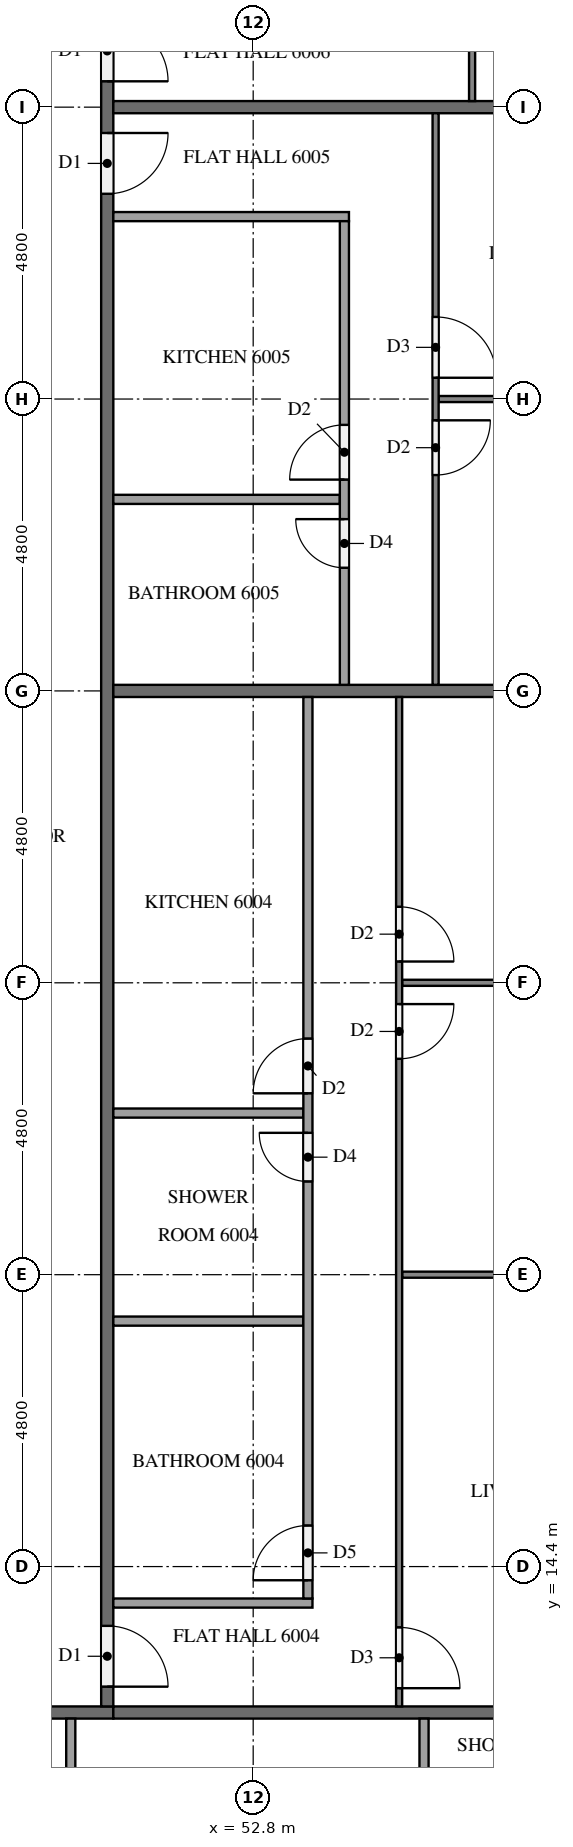
"""IFC4 building model, lengths in metres.
Left out: names, types, materials, properties, quantities, classifications, styles, units other than length and angle.
Written with IfcOpenShell. Run it as: python <this file> out.ifc"""

import sys

from ifc_helpers import new_model, si_unit, direction, frame, frame_2d, origin, place, context, subcontext, project, spatial, rectangle, extrude, element, fill, save


model = new_model("IFC4")
c1 = context("Model", 3, precision=1e-05, world=origin(), true_north=direction((0.0, 1.0)))
c2 = subcontext(c1, "Body", "Model", "MODEL_VIEW")
j1 = project(units=[si_unit("LENGTHUNIT", "METRE"), si_unit("PLANEANGLEUNIT", "RADIAN")], contexts=[c1])
p1 = place(None, origin())
s1 = spatial("IfcSite", under=j1, at=p1, CompositionType="ELEMENT")
p2 = place(p1, origin())
s2 = spatial("IfcBuilding", under=s1, at=p2, CompositionType="ELEMENT")
p3 = place(p2, frame((0.0, 0.0, 229.8)))
s3 = spatial("IfcBuildingStorey", under=s2, at=p3, CompositionType="ELEMENT", Elevation=229.8)
p4 = place(p3, frame((50.5, 12.0, 0.0), z_axis=(0.0, 0.0, 1.0), x_axis=(-1.0, 0.0, 0.0)))
e1 = element("IfcWall", 1, at=p4, inside=s3, PredefinedType="PARTITIONING", context=c2, shape_type="SweptSolid", body=[
    extrude(rectangle(XDim=38.6, YDim=0.2, at=frame_2d((19.3, 0.0))), origin(), (0.0, 0.0, 1.0), 3.1),
])
p5 = place(p4, frame((19.675, 0.0, 0.0)))
e2 = element("IfcOpeningElement", 2, at=p5, cuts=e1, PredefinedType="OPENING", context=c2, shape_type="SweptSolid", body=[
    extrude(rectangle(XDim=1.1, YDim=2.1, at=frame_2d((0.55, 1.05))), frame((0.0, 0.11, 0.0), z_axis=(0.0, -1.0, 0.0), x_axis=(1.0, 0.0, 0.0)), (0.0, 0.0, 1.0), 0.22),
])
p6 = place(p4, frame((2.925, 0.0, 0.0)))
e3 = element("IfcOpeningElement", 3, at=p6, cuts=e1, PredefinedType="OPENING", context=c2, shape_type="SweptSolid", body=[
    extrude(rectangle(XDim=1.0, YDim=2.1, at=frame_2d((0.5, 1.05))), frame((0.0, 0.11, 0.0), z_axis=(0.0, -1.0, 0.0), x_axis=(1.0, 0.0, 0.0)), (0.0, 0.0, 1.0), 0.22),
])
p7 = place(p4, frame((1.075, 0.0, 0.0)))
e4 = element("IfcOpeningElement", 4, at=p7, cuts=e1, PredefinedType="OPENING", context=c2, shape_type="SweptSolid", body=[
    extrude(rectangle(XDim=1.0, YDim=2.1, at=frame_2d((0.5, 1.05))), frame((0.0, 0.11, 0.0), z_axis=(0.0, -1.0, 0.0), x_axis=(1.0, 0.0, 0.0)), (0.0, 0.0, 1.0), 0.22),
])
p8 = place(p3, frame((50.4, 40.7, 0.0), z_axis=(0.0, 0.0, 1.0), x_axis=(0.0, -1.0, 0.0)))
e5 = element("IfcWall", 5, at=p8, inside=s3, PredefinedType="PARTITIONING", context=c2, shape_type="SweptSolid", body=[
    extrude(rectangle(XDim=28.6, YDim=0.2, at=frame_2d((14.3, 0.0))), origin(), (0.0, 0.0, 1.0), 3.1),
])
p9 = place(p8, frame((27.275, 0.0, 0.0)))
e6 = element("IfcOpeningElement", 6, at=p9, cuts=e5, PredefinedType="OPENING", context=c2, shape_type="SweptSolid", body=[
    extrude(rectangle(XDim=1.0, YDim=2.1, at=frame_2d((0.5, 1.05))), frame((0.0, 0.11, 0.0), z_axis=(0.0, -1.0, 0.0), x_axis=(1.0, 0.0, 0.0)), (0.0, 0.0, 1.0), 0.22),
])
p10 = place(p8, frame((2.725, 0.0, 0.0)))
e7 = element("IfcOpeningElement", 7, at=p10, cuts=e5, PredefinedType="OPENING", context=c2, shape_type="SweptSolid", body=[
    extrude(rectangle(XDim=1.0, YDim=2.1, at=frame_2d((0.5, 1.05))), frame((0.0, 0.11, 0.0), z_axis=(0.0, -1.0, 0.0), x_axis=(1.0, 0.0, 0.0)), (0.0, 0.0, 1.0), 0.22),
])
p11 = place(p8, frame((0.875, 0.0, 0.0)))
e8 = element("IfcOpeningElement", 8, at=p11, cuts=e5, PredefinedType="OPENING", context=c2, shape_type="SweptSolid", body=[
    extrude(rectangle(XDim=1.0, YDim=2.1, at=frame_2d((0.5, 1.05))), frame((0.0, 0.11, 0.0), z_axis=(0.0, -1.0, 0.0), x_axis=(1.0, 0.0, 0.0)), (0.0, 0.0, 1.0), 0.22),
])
p12 = place(p3, frame((50.5, 12.0, 0.0), z_axis=(0.0, 0.0, 1.0), x_axis=(1.0, 0.0, 0.0)))
e9 = element("IfcWall", 9, at=p12, inside=s3, PredefinedType="PARTITIONING", context=c2, shape_type="SweptSolid", body=[
    extrude(rectangle(XDim=11.8, YDim=0.2, at=frame_2d((5.9, 0.0))), origin(), (0.0, 0.0, 1.0), 3.1),
])
for number, where, z_axis, x_axis in (
    (10, (50.5, 28.8, 0.0), (0.0, 0.0, 1.0), (1.0, 0.0, 0.0)),
    (11, (50.5, 38.4, 0.0), (0.0, 0.0, 1.0), (1.0, 0.0, 0.0)),
):
    element("IfcWall", number, at=place(p3, frame(where, z_axis=z_axis, x_axis=x_axis)), inside=s3, PredefinedType="PARTITIONING", context=c2, shape_type="SweptSolid", body=[
        extrude(rectangle(XDim=11.575, YDim=0.2, at=frame_2d((5.788, 0.0))), origin(), (0.0, 0.0, 1.0), 3.1),
    ])
p13 = place(p3, frame((55.61, 11.9, 0.0), z_axis=(0.0, 0.0, 1.0), x_axis=(0.0, -1.0, 0.0)))
e12 = element("IfcWall", 12, at=p13, inside=s3, PredefinedType="PARTITIONING", context=c2, shape_type="SweptSolid", body=[
    extrude(rectangle(XDim=2.075, YDim=0.15, at=frame_2d((1.038, 0.0))), origin(), (0.0, 0.0, 1.0), 3.1),
])
p14 = place(p3, frame((49.8, 11.9, 0.0), z_axis=(0.0, 0.0, 1.0), x_axis=(0.0, -1.0, 0.0)))
e13 = element("IfcWall", 13, at=p14, inside=s3, PredefinedType="PARTITIONING", context=c2, shape_type="SweptSolid", body=[
    extrude(rectangle(XDim=2.225, YDim=0.15, at=frame_2d((1.112, 0.0))), origin(), (0.0, 0.0, 1.0), 3.1),
])
p15 = place(p3, frame((55.25, 19.2, 0.0), z_axis=(0.0, 0.0, 1.0), x_axis=(1.0, 0.0, 0.0)))
e14 = element("IfcWall", 14, at=p15, inside=s3, PredefinedType="PARTITIONING", context=c2, shape_type="SweptSolid", body=[
    extrude(rectangle(XDim=6.825, YDim=0.1, at=frame_2d((3.413, 0.0))), origin(), (0.0, 0.0, 1.0), 3.1),
])
p16 = place(p3, frame((55.25, 24.0, 0.0), z_axis=(0.0, 0.0, 1.0), x_axis=(1.0, 0.0, 0.0)))
e15 = element("IfcWall", 15, at=p16, inside=s3, PredefinedType="PARTITIONING", context=c2, shape_type="SweptSolid", body=[
    extrude(rectangle(XDim=7.05, YDim=0.1, at=frame_2d((3.525, 0.0))), origin(), (0.0, 0.0, 1.0), 3.1),
])
p17 = place(p3, frame((55.2, 28.7, 0.0), z_axis=(0.0, 0.0, 1.0), x_axis=(0.0, -1.0, 0.0)))
e16 = element("IfcWall", 16, at=p17, inside=s3, PredefinedType="PARTITIONING", context=c2, shape_type="SweptSolid", body=[
    extrude(rectangle(XDim=16.6, YDim=0.1, at=frame_2d((8.3, 0.0))), origin(), (0.0, 0.0, 1.0), 3.1),
])
p18 = place(p17, frame((15.3, 0.0, 0.0)))
e17 = element("IfcOpeningElement", 17, at=p18, cuts=e16, PredefinedType="OPENING", context=c2, shape_type="SweptSolid", body=[
    extrude(rectangle(XDim=1.0, YDim=2.1, at=frame_2d((0.5, 1.05))), frame((0.0, 0.06, 0.0), z_axis=(0.0, -1.0, 0.0), x_axis=(1.0, 0.0, 0.0)), (0.0, 0.0, 1.0), 0.12),
])
p19 = place(p17, frame((5.05, 0.0, 0.0)))
e18 = element("IfcOpeningElement", 18, at=p19, cuts=e16, PredefinedType="OPENING", context=c2, shape_type="SweptSolid", body=[
    extrude(rectangle(XDim=0.9, YDim=2.1, at=frame_2d((0.45, 1.05))), frame((0.0, 0.06, 0.0), z_axis=(0.0, -1.0, 0.0), x_axis=(1.0, 0.0, 0.0)), (0.0, 0.0, 1.0), 0.12),
])
p20 = place(p17, frame((3.45, 0.0, 0.0)))
e19 = element("IfcOpeningElement", 19, at=p20, cuts=e16, PredefinedType="OPENING", context=c2, shape_type="SweptSolid", body=[
    extrude(rectangle(XDim=0.9, YDim=2.1, at=frame_2d((0.45, 1.05))), frame((0.0, 0.06, 0.0), z_axis=(0.0, -1.0, 0.0), x_axis=(1.0, 0.0, 0.0)), (0.0, 0.0, 1.0), 0.12),
])
for number, where, z_axis, x_axis in (
    (20, (50.5, 18.437, 0.0), (0.0, 0.0, 1.0), (1.0, 0.0, 0.0)),
    (21, (50.5, 21.858, 0.0), (0.0, 0.0, 1.0), (1.0, 0.0, 0.0)),
):
    element("IfcWall", number, at=place(p3, frame(where, z_axis=z_axis, x_axis=x_axis)), inside=s3, PredefinedType="PARTITIONING", context=c2, shape_type="SweptSolid", body=[
        extrude(rectangle(XDim=3.125, YDim=0.15, at=frame_2d((1.562, 0.0))), origin(), (0.0, 0.0, 1.0), 3.1),
    ])
p21 = place(p3, frame((50.5, 13.8, 0.0), z_axis=(0.0, 0.0, 1.0), x_axis=(1.0, 0.0, 0.0)))
e22 = element("IfcWall", 22, at=p21, inside=s3, PredefinedType="PARTITIONING", context=c2, shape_type="SweptSolid", body=[
    extrude(rectangle(XDim=3.275, YDim=0.15, at=frame_2d((1.637, 0.0))), origin(), (0.0, 0.0, 1.0), 3.1),
])
p22 = place(p3, frame((53.7, 13.875, 0.0), z_axis=(0.0, 0.0, 1.0), x_axis=(0.0, 1.0, 0.0)))
e23 = element("IfcWall", 23, at=p22, inside=s3, PredefinedType="PARTITIONING", context=c2, shape_type="SweptSolid", body=[
    extrude(rectangle(XDim=14.825, YDim=0.15, at=frame_2d((7.413, 0.0))), origin(), (0.0, 0.0, 1.0), 3.1),
])
p23 = place(p22, frame((0.3, 0.0, 0.0)))
e24 = element("IfcOpeningElement", 24, at=p23, cuts=e23, PredefinedType="OPENING", context=c2, shape_type="SweptSolid", body=[
    extrude(rectangle(XDim=0.9, YDim=2.1, at=frame_2d((0.45, 1.05))), frame((0.0, 0.085, 0.0), z_axis=(0.0, -1.0, 0.0), x_axis=(1.0, 0.0, 0.0)), (0.0, 0.0, 1.0), 0.17),
])
p24 = place(p22, frame((6.858, 0.0, 0.0)))
e25 = element("IfcOpeningElement", 25, at=p24, cuts=e23, PredefinedType="OPENING", context=c2, shape_type="SweptSolid", body=[
    extrude(rectangle(XDim=0.8, YDim=2.1, at=frame_2d((0.4, 1.05))), frame((0.0, 0.085, 0.0), z_axis=(0.0, -1.0, 0.0), x_axis=(1.0, 0.0, 0.0)), (0.0, 0.0, 1.0), 0.17),
])
p25 = place(p22, frame((8.308, 0.0, 0.0)))
e26 = element("IfcOpeningElement", 26, at=p25, cuts=e23, PredefinedType="OPENING", context=c2, shape_type="SweptSolid", body=[
    extrude(rectangle(XDim=0.9, YDim=2.1, at=frame_2d((0.45, 1.05))), frame((0.0, 0.085, 0.0), z_axis=(0.0, -1.0, 0.0), x_axis=(1.0, 0.0, 0.0)), (0.0, 0.0, 1.0), 0.17),
])
p26 = place(p3, frame((55.85, 33.6, 0.0), z_axis=(0.0, 0.0, 1.0), x_axis=(1.0, 0.0, 0.0)))
e27 = element("IfcWall", 27, at=p26, inside=s3, PredefinedType="PARTITIONING", context=c2, shape_type="SweptSolid", body=[
    extrude(rectangle(XDim=6.45, YDim=0.1, at=frame_2d((3.225, 0.0))), origin(), (0.0, 0.0, 1.0), 3.1),
])
p27 = place(p3, frame((55.8, 38.3, 0.0), z_axis=(0.0, 0.0, 1.0), x_axis=(0.0, -1.0, 0.0)))
e28 = element("IfcWall", 28, at=p27, inside=s3, PredefinedType="PARTITIONING", context=c2, shape_type="SweptSolid", body=[
    extrude(rectangle(XDim=9.4, YDim=0.1, at=frame_2d((4.7, 0.0))), origin(), (0.0, 0.0, 1.0), 3.1),
])
p28 = place(p27, frame((3.35, 0.0, 0.0)))
e29 = element("IfcOpeningElement", 29, at=p28, cuts=e28, PredefinedType="OPENING", context=c2, shape_type="SweptSolid", body=[
    extrude(rectangle(XDim=1.0, YDim=2.1, at=frame_2d((0.5, 1.05))), frame((0.0, 0.06, 0.0), z_axis=(0.0, -1.0, 0.0), x_axis=(1.0, 0.0, 0.0)), (0.0, 0.0, 1.0), 0.12),
])
p29 = place(p27, frame((5.05, 0.0, 0.0)))
e30 = element("IfcOpeningElement", 30, at=p29, cuts=e28, PredefinedType="OPENING", context=c2, shape_type="SweptSolid", body=[
    extrude(rectangle(XDim=0.9, YDim=2.1, at=frame_2d((0.45, 1.05))), frame((0.0, 0.06, 0.0), z_axis=(0.0, -1.0, 0.0), x_axis=(1.0, 0.0, 0.0)), (0.0, 0.0, 1.0), 0.12),
])
p30 = place(p3, frame((50.5, 31.95, 0.0), z_axis=(0.0, 0.0, 1.0), x_axis=(1.0, 0.0, 0.0)))
e31 = element("IfcWall", 31, at=p30, inside=s3, PredefinedType="PARTITIONING", context=c2, shape_type="SweptSolid", body=[
    extrude(rectangle(XDim=3.725, YDim=0.15, at=frame_2d((1.863, 0.0))), origin(), (0.0, 0.0, 1.0), 3.1),
])
p31 = place(p3, frame((50.5, 36.6, 0.0), z_axis=(0.0, 0.0, 1.0), x_axis=(1.0, 0.0, 0.0)))
e32 = element("IfcWall", 32, at=p31, inside=s3, PredefinedType="PARTITIONING", context=c2, shape_type="SweptSolid", body=[
    extrude(rectangle(XDim=3.875, YDim=0.15, at=frame_2d((1.938, 0.0))), origin(), (0.0, 0.0, 1.0), 3.1),
])
p32 = place(p3, frame((54.3, 28.9, 0.0), z_axis=(0.0, 0.0, 1.0), x_axis=(0.0, 1.0, 0.0)))
e33 = element("IfcWall", 33, at=p32, inside=s3, PredefinedType="PARTITIONING", context=c2, shape_type="SweptSolid", body=[
    extrude(rectangle(XDim=7.625, YDim=0.15, at=frame_2d((3.812, 0.0))), origin(), (0.0, 0.0, 1.0), 3.1),
])
p33 = place(p32, frame((3.375, 0.0, 0.0)))
e34 = element("IfcOpeningElement", 34, at=p33, cuts=e33, PredefinedType="OPENING", context=c2, shape_type="SweptSolid", body=[
    extrude(rectangle(XDim=0.9, YDim=2.1, at=frame_2d((0.45, 1.05))), frame((0.0, 0.085, 0.0), z_axis=(0.0, -1.0, 0.0), x_axis=(1.0, 0.0, 0.0)), (0.0, 0.0, 1.0), 0.17),
])
p34 = place(p32, frame((1.925, 0.0, 0.0)))
e35 = element("IfcOpeningElement", 35, at=p34, cuts=e33, PredefinedType="OPENING", context=c2, shape_type="SweptSolid", body=[
    extrude(rectangle(XDim=0.8, YDim=2.1, at=frame_2d((0.4, 1.05))), frame((0.0, 0.085, 0.0), z_axis=(0.0, -1.0, 0.0), x_axis=(1.0, 0.0, 0.0)), (0.0, 0.0, 1.0), 0.17),
])
p35 = place(p3, frame((56.4, 52.7, 0.0), z_axis=(0.0, 0.0, 1.0), x_axis=(0.0, -1.0, 0.0)))
e36 = element("IfcWall", 36, at=p35, inside=s3, PredefinedType="PARTITIONING", context=c2, shape_type="SweptSolid", body=[
    extrude(rectangle(XDim=14.2, YDim=0.1, at=frame_2d((7.1, 0.0))), origin(), (0.0, 0.0, 1.0), 3.1),
])
p36 = place(p35, frame((9.85, 0.0, 0.0)))
e37 = element("IfcOpeningElement", 37, at=p36, cuts=e36, PredefinedType="OPENING", context=c2, shape_type="SweptSolid", body=[
    extrude(rectangle(XDim=0.9, YDim=2.1, at=frame_2d((0.45, 1.05))), frame((0.0, 0.06, 0.0), z_axis=(0.0, -1.0, 0.0), x_axis=(1.0, 0.0, 0.0)), (0.0, 0.0, 1.0), 0.12),
])
p37 = place(p35, frame((8.15, 0.0, 0.0)))
e38 = element("IfcOpeningElement", 38, at=p37, cuts=e36, PredefinedType="OPENING", context=c2, shape_type="SweptSolid", body=[
    extrude(rectangle(XDim=1.0, YDim=2.1, at=frame_2d((0.5, 1.05))), frame((0.0, 0.06, 0.0), z_axis=(0.0, -1.0, 0.0), x_axis=(1.0, 0.0, 0.0)), (0.0, 0.0, 1.0), 0.12),
])
p38 = place(p35, frame((0.4, 0.0, 0.0)))
e39 = element("IfcOpeningElement", 39, at=p38, cuts=e36, PredefinedType="OPENING", context=c2, shape_type="SweptSolid", body=[
    extrude(rectangle(XDim=0.9, YDim=2.1, at=frame_2d((0.45, 1.05))), frame((0.0, 0.06, 0.0), z_axis=(0.0, -1.0, 0.0), x_axis=(1.0, 0.0, 0.0)), (0.0, 0.0, 1.0), 0.12),
])
p39 = place(p9, origin())
e40 = element("IfcDoor", 40, at=p39, inside=s3, OperationType="SINGLE_SWING_RIGHT", PredefinedType="DOOR", context=c2, shape_type="SweptSolid", body=[
    extrude(rectangle(XDim=1.0, YDim=2.1, at=frame_2d((0.5, 1.05))), frame((0.0, 0.025, 0.0), z_axis=(0.0, -1.0, 0.0), x_axis=(1.0, 0.0, 0.0)), (0.0, 0.0, 1.0), 0.05),
])
fill(e6, e40)
p40 = place(p10, origin())
e41 = element("IfcDoor", 41, at=p40, inside=s3, OperationType="SINGLE_SWING_LEFT", PredefinedType="DOOR", context=c2, shape_type="SweptSolid", body=[
    extrude(rectangle(XDim=1.0, YDim=2.1, at=frame_2d((0.5, 1.05))), frame((0.0, 0.025, 0.0), z_axis=(0.0, -1.0, 0.0), x_axis=(1.0, 0.0, 0.0)), (0.0, 0.0, 1.0), 0.05),
])
fill(e7, e41)
p41 = place(p11, origin())
e42 = element("IfcDoor", 42, at=p41, inside=s3, OperationType="SINGLE_SWING_RIGHT", PredefinedType="DOOR", context=c2, shape_type="SweptSolid", body=[
    extrude(rectangle(XDim=1.0, YDim=2.1, at=frame_2d((0.5, 1.05))), frame((0.0, 0.025, 0.0), z_axis=(0.0, -1.0, 0.0), x_axis=(1.0, 0.0, 0.0)), (0.0, 0.0, 1.0), 0.05),
])
fill(e8, e42)
p42 = place(p18, origin())
e43 = element("IfcDoor", 43, at=p42, inside=s3, OperationType="SINGLE_SWING_RIGHT", PredefinedType="DOOR", context=c2, shape_type="SweptSolid", body=[
    extrude(rectangle(XDim=1.0, YDim=2.1, at=frame_2d((0.5, 1.05))), frame((0.0, 0.025, 0.0), z_axis=(0.0, -1.0, 0.0), x_axis=(1.0, 0.0, 0.0)), (0.0, 0.0, 1.0), 0.05),
])
fill(e17, e43)
p43 = place(p19, origin())
e44 = element("IfcDoor", 44, at=p43, inside=s3, OperationType="SINGLE_SWING_LEFT", PredefinedType="DOOR", context=c2, shape_type="SweptSolid", body=[
    extrude(rectangle(XDim=0.9, YDim=2.1, at=frame_2d((0.45, 1.05))), frame((0.0, 0.025, 0.0), z_axis=(0.0, -1.0, 0.0), x_axis=(1.0, 0.0, 0.0)), (0.0, 0.0, 1.0), 0.05),
])
fill(e18, e44)
p44 = place(p20, origin())
e45 = element("IfcDoor", 45, at=p44, inside=s3, OperationType="SINGLE_SWING_RIGHT", PredefinedType="DOOR", context=c2, shape_type="SweptSolid", body=[
    extrude(rectangle(XDim=0.9, YDim=2.1, at=frame_2d((0.45, 1.05))), frame((0.0, 0.025, 0.0), z_axis=(0.0, -1.0, 0.0), x_axis=(1.0, 0.0, 0.0)), (0.0, 0.0, 1.0), 0.05),
])
fill(e19, e45)
p45 = place(p23, origin())
e46 = element("IfcDoor", 46, at=p45, inside=s3, OperationType="SINGLE_SWING_LEFT", PredefinedType="DOOR", context=c2, shape_type="SweptSolid", body=[
    extrude(rectangle(XDim=0.9, YDim=2.1, at=frame_2d((0.45, 1.05))), frame((0.0, 0.025, 0.0), z_axis=(0.0, -1.0, 0.0), x_axis=(1.0, 0.0, 0.0)), (0.0, 0.0, 1.0), 0.05),
])
fill(e24, e46)
p46 = place(p24, origin())
e47 = element("IfcDoor", 47, at=p46, inside=s3, OperationType="SINGLE_SWING_RIGHT", PredefinedType="DOOR", context=c2, shape_type="SweptSolid", body=[
    extrude(rectangle(XDim=0.8, YDim=2.1, at=frame_2d((0.4, 1.05))), frame((0.0, 0.025, 0.0), z_axis=(0.0, -1.0, 0.0), x_axis=(1.0, 0.0, 0.0)), (0.0, 0.0, 1.0), 0.05),
])
fill(e25, e47)
p47 = place(p25, origin())
e48 = element("IfcDoor", 48, at=p47, inside=s3, OperationType="SINGLE_SWING_LEFT", PredefinedType="DOOR", context=c2, shape_type="SweptSolid", body=[
    extrude(rectangle(XDim=0.9, YDim=2.1, at=frame_2d((0.45, 1.05))), frame((0.0, 0.025, 0.0), z_axis=(0.0, -1.0, 0.0), x_axis=(1.0, 0.0, 0.0)), (0.0, 0.0, 1.0), 0.05),
])
fill(e26, e48)
p48 = place(p28, origin())
e49 = element("IfcDoor", 49, at=p48, inside=s3, OperationType="SINGLE_SWING_RIGHT", PredefinedType="DOOR", context=c2, shape_type="SweptSolid", body=[
    extrude(rectangle(XDim=1.0, YDim=2.1, at=frame_2d((0.5, 1.05))), frame((0.0, 0.025, 0.0), z_axis=(0.0, -1.0, 0.0), x_axis=(1.0, 0.0, 0.0)), (0.0, 0.0, 1.0), 0.05),
])
fill(e29, e49)
p49 = place(p29, origin())
e50 = element("IfcDoor", 50, at=p49, inside=s3, OperationType="SINGLE_SWING_LEFT", PredefinedType="DOOR", context=c2, shape_type="SweptSolid", body=[
    extrude(rectangle(XDim=0.9, YDim=2.1, at=frame_2d((0.45, 1.05))), frame((0.0, 0.025, 0.0), z_axis=(0.0, -1.0, 0.0), x_axis=(1.0, 0.0, 0.0)), (0.0, 0.0, 1.0), 0.05),
])
fill(e30, e50)
p50 = place(p33, origin())
e51 = element("IfcDoor", 51, at=p50, inside=s3, OperationType="SINGLE_SWING_LEFT", PredefinedType="DOOR", context=c2, shape_type="SweptSolid", body=[
    extrude(rectangle(XDim=0.9, YDim=2.1, at=frame_2d((0.45, 1.05))), frame((0.0, 0.025, 0.0), z_axis=(0.0, -1.0, 0.0), x_axis=(1.0, 0.0, 0.0)), (0.0, 0.0, 1.0), 0.05),
])
fill(e34, e51)
p51 = place(p34, origin())
e52 = element("IfcDoor", 52, at=p51, inside=s3, OperationType="SINGLE_SWING_RIGHT", PredefinedType="DOOR", context=c2, shape_type="SweptSolid", body=[
    extrude(rectangle(XDim=0.8, YDim=2.1, at=frame_2d((0.4, 1.05))), frame((0.0, 0.025, 0.0), z_axis=(0.0, -1.0, 0.0), x_axis=(1.0, 0.0, 0.0)), (0.0, 0.0, 1.0), 0.05),
])
fill(e35, e52)
save(model, sys.argv[1])
